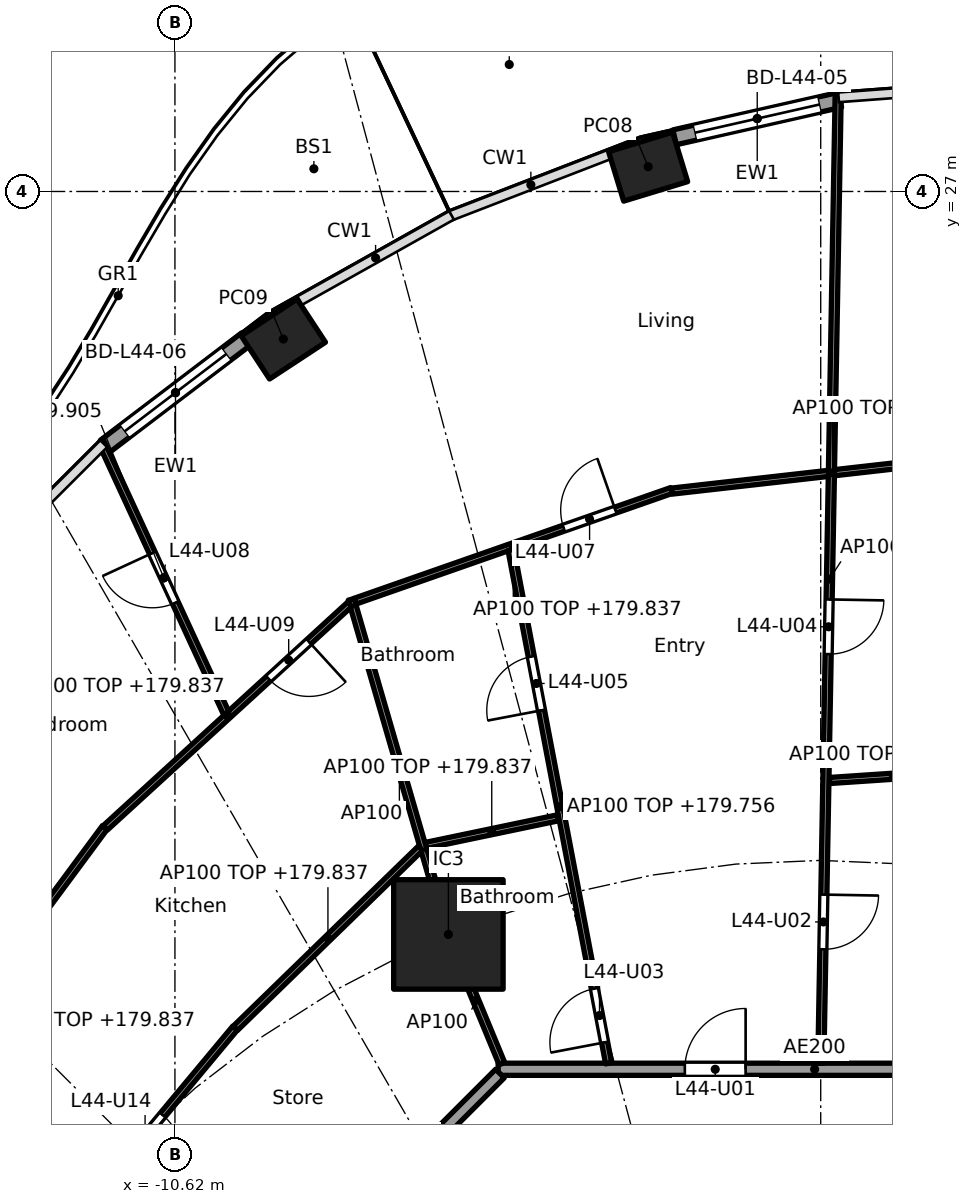
"""IFC4 building model, lengths in metres.
Left out: names, types, materials, properties, quantities, classifications, styles, units other than length and angle.
Written with IfcOpenShell. Run it as: python <this file> out.ifc"""

import sys

from ifc_helpers import new_model, si_unit, direction, frame, frame_2d, origin, origin_2d, place, context, subcontext, project, spatial, rectangle, hollow_rectangle, extrude, element, fill, save


model = new_model("IFC4")
c1 = context("Model", 3, precision=1e-05, world=origin(), true_north=direction((0.0, 1.0)))
c2 = subcontext(c1, "Body", "Model", "MODEL_VIEW")
j1 = project(units=[si_unit("LENGTHUNIT", "METRE"), si_unit("PLANEANGLEUNIT", "RADIAN")], contexts=[c1])
p1 = place(None, origin())
s1 = spatial("IfcSite", under=j1, at=p1, CompositionType="ELEMENT")
p2 = place(p1, origin())
s2 = spatial("IfcBuilding", under=s1, at=p2, CompositionType="ELEMENT")
p3 = place(p2, frame((0.0, 0.0, 177.0)))
s3 = spatial("IfcBuildingStorey", under=s2, at=p3, CompositionType="ELEMENT", Elevation=177.0)
for number, where, z_axis, x_axis in (
    (1, (-2.838, 27.408, 0.0), (0.0, 0.0, 1.0), (-0.957, -0.292, 0.0)),
    (2, (-8.837, 24.573, 0.0), (0.0, 0.0, 1.0), (-0.836, -0.549, 0.0)),
):
    element("IfcColumn", number, at=place(p3, frame(where, z_axis=z_axis, x_axis=x_axis)), inside=s3, PredefinedType="COLUMN", context=c2, shape_type="SweptSolid", body=[
        extrude(hollow_rectangle(XDim=1.1, YDim=0.85, WallThickness=0.036, at=origin_2d()), origin(), (0.0, 0.0, 1.0), 3.7),
    ])
p4 = place(p3, frame((-6.123, 14.782, 0.0), z_axis=(0.0, 0.0, 1.0), x_axis=(1.0, 0.0, 0.0)))
e3 = element("IfcColumn", 3, at=p4, inside=s3, PredefinedType="COLUMN", context=c2, shape_type="SweptSolid", body=[
    extrude(rectangle(XDim=1.8, YDim=1.8, at=origin_2d()), origin(), (0.0, 0.0, 1.0), 3.7),
])
p5 = place(p3, frame((-2.404, 27.891, 0.0), z_axis=(0.0, 0.0, 1.0), x_axis=(0.975324329911, 0.220776926974, 0.0)))
e4 = element("IfcWall", 4, at=p5, inside=s3, PredefinedType="SOLIDWALL", context=c2, shape_type="SweptSolid", body=[
    extrude(rectangle(XDim=2.788, YDim=0.25, at=frame_2d((1.394, 0.0))), origin(), (0.0, 0.0, 1.0), 3.44),
])
p6 = place(p5, frame((0.344, 0.0, 0.0)))
e5 = element("IfcOpeningElement", 5, at=p6, cuts=e4, PredefinedType="OPENING", context=c2, shape_type="SweptSolid", body=[
    extrude(rectangle(XDim=2.1, YDim=2.4, at=frame_2d((1.05, 1.2))), frame((0.0, 0.135, 0.0), z_axis=(0.0, -1.0, 0.0), x_axis=(1.0, 0.0, 0.0)), (0.0, 0.0, 1.0), 0.27),
])
p7 = place(p3, frame((-11.772, 22.809, 0.0), z_axis=(0.0, 0.0, 1.0), x_axis=(0.796055733703, 0.60522332146, 0.0)))
e6 = element("IfcWall", 6, at=p7, inside=s3, PredefinedType="SOLIDWALL", context=c2, shape_type="SweptSolid", body=[
    extrude(rectangle(XDim=2.917, YDim=0.25, at=frame_2d((1.458, 0.0))), origin(), (0.0, 0.0, 1.0), 3.44),
])
p8 = place(p7, frame((0.408, 0.0, 0.0)))
e7 = element("IfcOpeningElement", 7, at=p8, cuts=e6, PredefinedType="OPENING", context=c2, shape_type="SweptSolid", body=[
    extrude(rectangle(XDim=2.1, YDim=2.4, at=frame_2d((1.05, 1.2))), frame((0.0, 0.135, 0.0), z_axis=(0.0, -1.0, 0.0), x_axis=(1.0, 0.0, 0.0)), (0.0, 0.0, 1.0), 0.27),
])
p9 = place(p3, frame((5.104, 12.565, 0.0), z_axis=(0.0, 0.0, 1.0), x_axis=(-1.0, 0.0, 0.0)))
e8 = element("IfcWall", 8, at=p9, inside=s3, PredefinedType="PARTITIONING", context=c2, shape_type="SweptSolid", body=[
    extrude(rectangle(XDim=10.409, YDim=0.2, at=frame_2d((5.205, 0.0))), origin(), (0.0, 0.0, 1.0), 3.44),
])
p10 = place(p9, frame((6.339, 0.0, 0.0)))
e9 = element("IfcOpeningElement", 9, at=p10, cuts=e8, PredefinedType="OPENING", context=c2, shape_type="SweptSolid", body=[
    extrude(rectangle(XDim=1.0, YDim=2.1, at=frame_2d((0.5, 1.05))), frame((0.0, 0.11, 0.0), z_axis=(0.0, -1.0, 0.0), x_axis=(1.0, 0.0, 0.0)), (0.0, 0.0, 1.0), 0.22),
])
p11 = place(p3, frame((-5.275, 12.494, 0.0), z_axis=(0.0, 0.0, 1.0), x_axis=(-0.707106781187, -0.707106781187, 0.0)))
e10 = element("IfcWall", 10, at=p11, inside=s3, PredefinedType="PARTITIONING", context=c2, shape_type="SweptSolid", body=[
    extrude(rectangle(XDim=10.209, YDim=0.2, at=frame_2d((5.104, 0.0))), origin(), (0.0, 0.0, 1.0), 3.44),
])
p12 = place(p3, frame((2.244, 17.455, 0.0), z_axis=(0.0, 0.0, 1.0), x_axis=(-0.997756833447, -0.06694252243, 0.0)))
e11 = element("IfcWall", 11, at=p12, inside=s3, PredefinedType="PARTITIONING", context=c2, shape_type="SweptSolid", body=[
    extrude(rectangle(XDim=2.104, YDim=0.1, at=frame_2d((1.052, 0.0))), origin(), (0.0, 0.0, 1.0), 2.837),
])
p13 = place(p3, frame((2.842, 22.671, 0.0), z_axis=(0.0, 0.0, 1.0), x_axis=(-0.993660315081, -0.112424099879, 0.0)))
e12 = element("IfcWall", 12, at=p13, inside=s3, PredefinedType="PARTITIONING", context=c2, shape_type="SweptSolid", body=[
    extrude(rectangle(XDim=5.325, YDim=0.1, at=frame_2d((2.662, 0.0))), origin(), (0.0, 0.0, 1.0), 2.837),
])
p14 = place(p3, frame((0.002, 12.665, 0.0), z_axis=(0.0, 0.0, 1.0), x_axis=(0.01792079652, 0.999839409631, 0.0)))
e13 = element("IfcWall", 13, at=p14, inside=s3, PredefinedType="PARTITIONING", context=c2, shape_type="SweptSolid", body=[
    extrude(rectangle(XDim=15.926, YDim=0.1, at=frame_2d((7.963, 0.0))), origin(), (0.0, 0.0, 1.0), 2.756),
])
p15 = place(p14, frame((1.873, 0.0, 0.0)))
e14 = element("IfcOpeningElement", 14, at=p15, cuts=e13, PredefinedType="OPENING", context=c2, shape_type="SweptSolid", body=[
    extrude(rectangle(XDim=0.9, YDim=2.1, at=frame_2d((0.45, 1.05))), frame((0.0, 0.06, 0.0), z_axis=(0.0, -1.0, 0.0), x_axis=(1.0, 0.0, 0.0)), (0.0, 0.0, 1.0), 0.12),
])
p16 = place(p14, frame((6.728, 0.0, 0.0)))
e15 = element("IfcOpeningElement", 15, at=p16, cuts=e13, PredefinedType="OPENING", context=c2, shape_type="SweptSolid", body=[
    extrude(rectangle(XDim=0.9, YDim=2.1, at=frame_2d((0.45, 1.05))), frame((0.0, 0.06, 0.0), z_axis=(0.0, -1.0, 0.0), x_axis=(1.0, 0.0, 0.0)), (0.0, 0.0, 1.0), 0.12),
])
p17 = place(p3, frame((-2.452, 22.083, 0.0), z_axis=(0.0, 0.0, 1.0), x_axis=(-0.943916289103, -0.330184856051, 0.0)))
e16 = element("IfcWall", 16, at=p17, inside=s3, PredefinedType="PARTITIONING", context=c2, shape_type="SweptSolid", body=[
    extrude(rectangle(XDim=5.517, YDim=0.1, at=frame_2d((2.759, 0.0))), origin(), (0.0, 0.0, 1.0), 2.837),
])
p18 = place(p17, frame((0.979, 0.0, 0.0)))
e17 = element("IfcOpeningElement", 17, at=p18, cuts=e16, PredefinedType="OPENING", context=c2, shape_type="SweptSolid", body=[
    extrude(rectangle(XDim=0.9, YDim=2.1, at=frame_2d((0.45, 1.05))), frame((0.0, 0.06, 0.0), z_axis=(0.0, -1.0, 0.0), x_axis=(1.0, 0.0, 0.0)), (0.0, 0.0, 1.0), 0.12),
])
p19 = place(p3, frame((-3.488, 12.663, 0.0), z_axis=(0.0, 0.0, 1.0), x_axis=(-0.186783185485, 0.982401161247, 0.0)))
e18 = element("IfcWall", 18, at=p19, inside=s3, PredefinedType="PARTITIONING", context=c2, shape_type="SweptSolid", body=[
    extrude(rectangle(XDim=8.595, YDim=0.1, at=frame_2d((4.298, 0.0))), origin(), (0.0, 0.0, 1.0), 2.756),
])
p20 = place(p19, frame((0.35, 0.0, 0.0)))
e19 = element("IfcOpeningElement", 19, at=p20, cuts=e18, PredefinedType="OPENING", context=c2, shape_type="SweptSolid", body=[
    extrude(rectangle(XDim=0.9, YDim=2.1, at=frame_2d((0.45, 1.05))), frame((0.0, 0.06, 0.0), z_axis=(0.0, -1.0, 0.0), x_axis=(1.0, 0.0, 0.0)), (0.0, 0.0, 1.0), 0.12),
])
p21 = place(p19, frame((5.908, 0.0, 0.0)))
e20 = element("IfcOpeningElement", 20, at=p21, cuts=e18, PredefinedType="OPENING", context=c2, shape_type="SweptSolid", body=[
    extrude(rectangle(XDim=0.9, YDim=2.1, at=frame_2d((0.45, 1.05))), frame((0.0, 0.06, 0.0), z_axis=(0.0, -1.0, 0.0), x_axis=(1.0, 0.0, 0.0)), (0.0, 0.0, 1.0), 0.12),
])
p22 = place(p3, frame((-4.324, 16.699, 0.0), z_axis=(0.0, 0.0, 1.0), x_axis=(-0.978908011866, -0.204301503432, 0.0)))
e21 = element("IfcWall", 21, at=p22, inside=s3, PredefinedType="PARTITIONING", context=c2, shape_type="SweptSolid", body=[
    extrude(rectangle(XDim=2.218, YDim=0.1, at=frame_2d((1.109, 0.0))), origin(), (0.0, 0.0, 1.0), 2.837),
])
p23 = place(p3, frame((-5.243, 12.657, 0.0), z_axis=(0.0, 0.0, 1.0), x_axis=(-0.382719158442, 0.923864733477, 0.0)))
e22 = element("IfcWall", 22, at=p23, inside=s3, PredefinedType="PARTITIONING", context=c2, shape_type="SweptSolid", body=[
    extrude(rectangle(XDim=2.25, YDim=0.1, at=frame_2d((1.125, 0.0))), origin(), (0.0, 0.0, 1.0), 3.44),
])
p24 = place(p3, frame((-6.137, 14.83, 0.0), z_axis=(0.0, 0.0, 1.0), x_axis=(-0.278471793245, 0.960444407744, 0.0)))
e23 = element("IfcWall", 23, at=p24, inside=s3, PredefinedType="PARTITIONING", context=c2, shape_type="SweptSolid", body=[
    extrude(rectangle(XDim=5.688, YDim=0.1, at=frame_2d((2.844, 0.0))), origin(), (0.0, 0.0, 1.0), 3.44),
])
p25 = place(p3, frame((-6.58, 16.201, 0.0), z_axis=(0.0, 0.0, 1.0), x_axis=(-0.716946269374, -0.697128429223, 0.0)))
e24 = element("IfcWall", 24, at=p25, inside=s3, PredefinedType="PARTITIONING", context=c2, shape_type="SweptSolid", body=[
    extrude(rectangle(XDim=4.25, YDim=0.1, at=frame_2d((2.125, 0.0))), origin(), (0.0, 0.0, 1.0), 2.837),
])
p26 = place(p3, frame((-7.744, 20.212, 0.0), z_axis=(0.0, 0.0, 1.0), x_axis=(-0.738051761282, -0.674744097913, 0.0)))
e25 = element("IfcWall", 25, at=p26, inside=s3, PredefinedType="PARTITIONING", context=c2, shape_type="SweptSolid", body=[
    extrude(rectangle(XDim=5.449, YDim=0.1, at=frame_2d((2.725, 0.0))), origin(), (0.0, 0.0, 1.0), 2.837),
])
p27 = place(p26, frame((0.912, 0.0, 0.0)))
e26 = element("IfcOpeningElement", 26, at=p27, cuts=e25, PredefinedType="OPENING", context=c2, shape_type="SweptSolid", body=[
    extrude(rectangle(XDim=0.9, YDim=2.1, at=frame_2d((0.45, 1.05))), frame((0.0, 0.06, 0.0), z_axis=(0.0, -1.0, 0.0), x_axis=(1.0, 0.0, 0.0)), (0.0, 0.0, 1.0), 0.12),
])
p28 = place(p3, frame((-9.776, 18.419, 0.0), z_axis=(0.0, 0.0, 1.0), x_axis=(-0.418998197727, 0.907987065052, 0.0)))
e27 = element("IfcWall", 27, at=p28, inside=s3, PredefinedType="PARTITIONING", context=c2, shape_type="SweptSolid", body=[
    extrude(rectangle(XDim=4.904, YDim=0.1, at=frame_2d((2.452, 0.0))), origin(), (0.0, 0.0, 1.0), 2.905),
])
p29 = place(p28, frame((2.002, 0.0, 0.0)))
e28 = element("IfcOpeningElement", 28, at=p29, cuts=e27, PredefinedType="OPENING", context=c2, shape_type="SweptSolid", body=[
    extrude(rectangle(XDim=0.9, YDim=2.1, at=frame_2d((0.45, 1.05))), frame((0.0, 0.06, 0.0), z_axis=(0.0, -1.0, 0.0), x_axis=(1.0, 0.0, 0.0)), (0.0, 0.0, 1.0), 0.12),
])
p30 = place(p3, frame((-9.631, 13.242, 0.0), z_axis=(0.0, 0.0, 1.0), x_axis=(-0.640315711982, -0.768111833647, 0.0)))
e29 = element("IfcWall", 29, at=p30, inside=s3, PredefinedType="PARTITIONING", context=c2, shape_type="SweptSolid", body=[
    extrude(rectangle(XDim=4.572, YDim=0.1, at=frame_2d((2.286, 0.0))), origin(), (0.0, 0.0, 1.0), 2.837),
])
p31 = place(p30, frame((1.861, 0.0, 0.0)))
e30 = element("IfcOpeningElement", 30, at=p31, cuts=e29, PredefinedType="OPENING", context=c2, shape_type="SweptSolid", body=[
    extrude(rectangle(XDim=0.9, YDim=2.1, at=frame_2d((0.45, 1.05))), frame((0.0, 0.06, 0.0), z_axis=(0.0, -1.0, 0.0), x_axis=(1.0, 0.0, 0.0)), (0.0, 0.0, 1.0), 0.12),
])
p32 = place(p3, frame((-11.773, 16.542, 0.0), z_axis=(0.0, 0.0, 1.0), x_axis=(-0.594694305999, -0.803951915485, 0.0)))
e31 = element("IfcWall", 31, at=p32, inside=s3, PredefinedType="PARTITIONING", context=c2, shape_type="SweptSolid", body=[
    extrude(rectangle(XDim=5.772, YDim=0.1, at=frame_2d((2.886, 0.0))), origin(), (0.0, 0.0, 1.0), 2.837),
])
p33 = place(p3, frame((-10.189, 7.721, 0.0), z_axis=(0.0, 0.0, 1.0), x_axis=(-0.773134429339, 0.634242188892, 0.0)))
e32 = element("IfcWall", 32, at=p33, inside=s3, PredefinedType="PARTITIONING", context=c2, shape_type="SweptSolid", body=[
    extrude(rectangle(XDim=9.552, YDim=0.1, at=frame_2d((4.776, 0.0))), origin(), (0.0, 0.0, 1.0), 2.756),
])
p34 = place(p33, frame((4.367, 0.0, 0.0)))
e33 = element("IfcOpeningElement", 33, at=p34, cuts=e32, PredefinedType="OPENING", context=c2, shape_type="SweptSolid", body=[
    extrude(rectangle(XDim=0.9, YDim=2.1, at=frame_2d((0.45, 1.05))), frame((0.0, 0.06, 0.0), z_axis=(0.0, -1.0, 0.0), x_axis=(1.0, 0.0, 0.0)), (0.0, 0.0, 1.0), 0.12),
])
p35 = place(p6, origin())
e34 = element("IfcDoor", 34, at=p35, inside=s3, OperationType="SLIDING_TO_LEFT", PredefinedType="DOOR", context=c2, shape_type="SweptSolid", body=[
    extrude(rectangle(XDim=2.1, YDim=2.4, at=frame_2d((1.05, 1.2))), frame((0.0, 0.025, 0.0), z_axis=(0.0, -1.0, 0.0), x_axis=(1.0, 0.0, 0.0)), (0.0, 0.0, 1.0), 0.05),
])
fill(e5, e34)
p36 = place(p8, origin())
e35 = element("IfcDoor", 35, at=p36, inside=s3, OperationType="SLIDING_TO_LEFT", PredefinedType="DOOR", context=c2, shape_type="SweptSolid", body=[
    extrude(rectangle(XDim=2.1, YDim=2.4, at=frame_2d((1.05, 1.2))), frame((0.0, 0.025, 0.0), z_axis=(0.0, -1.0, 0.0), x_axis=(1.0, 0.0, 0.0)), (0.0, 0.0, 1.0), 0.05),
])
fill(e7, e35)
p37 = place(p10, frame((1.0, 0.0, 0.0), x_axis=(-1.0, 0.0, 0.0)))
e36 = element("IfcDoor", 36, at=p37, inside=s3, OperationType="SINGLE_SWING_RIGHT", PredefinedType="DOOR", context=c2, shape_type="SweptSolid", body=[
    extrude(rectangle(XDim=1.0, YDim=2.1, at=frame_2d((0.5, 1.05))), frame((0.0, 0.025, 0.0), z_axis=(0.0, -1.0, 0.0), x_axis=(1.0, 0.0, 0.0)), (0.0, 0.0, 1.0), 0.05),
])
fill(e9, e36)
p38 = place(p15, frame((0.9, 0.0, 0.0), x_axis=(-1.0, 0.0, 0.0)))
e37 = element("IfcDoor", 37, at=p38, inside=s3, OperationType="SINGLE_SWING_LEFT", PredefinedType="DOOR", context=c2, shape_type="SweptSolid", body=[
    extrude(rectangle(XDim=0.9, YDim=2.1, at=frame_2d((0.45, 1.05))), frame((0.0, 0.025, 0.0), z_axis=(0.0, -1.0, 0.0), x_axis=(1.0, 0.0, 0.0)), (0.0, 0.0, 1.0), 0.05),
])
fill(e14, e37)
p39 = place(p20, origin())
e38 = element("IfcDoor", 38, at=p39, inside=s3, OperationType="SINGLE_SWING_LEFT", PredefinedType="DOOR", context=c2, shape_type="SweptSolid", body=[
    extrude(rectangle(XDim=0.9, YDim=2.1, at=frame_2d((0.45, 1.05))), frame((0.0, 0.025, 0.0), z_axis=(0.0, -1.0, 0.0), x_axis=(1.0, 0.0, 0.0)), (0.0, 0.0, 1.0), 0.05),
])
fill(e19, e38)
p40 = place(p16, frame((0.9, 0.0, 0.0), x_axis=(-1.0, 0.0, 0.0)))
e39 = element("IfcDoor", 39, at=p40, inside=s3, OperationType="SINGLE_SWING_LEFT", PredefinedType="DOOR", context=c2, shape_type="SweptSolid", body=[
    extrude(rectangle(XDim=0.9, YDim=2.1, at=frame_2d((0.45, 1.05))), frame((0.0, 0.025, 0.0), z_axis=(0.0, -1.0, 0.0), x_axis=(1.0, 0.0, 0.0)), (0.0, 0.0, 1.0), 0.05),
])
fill(e15, e39)
p41 = place(p21, origin())
e40 = element("IfcDoor", 40, at=p41, inside=s3, OperationType="SINGLE_SWING_LEFT", PredefinedType="DOOR", context=c2, shape_type="SweptSolid", body=[
    extrude(rectangle(XDim=0.9, YDim=2.1, at=frame_2d((0.45, 1.05))), frame((0.0, 0.025, 0.0), z_axis=(0.0, -1.0, 0.0), x_axis=(1.0, 0.0, 0.0)), (0.0, 0.0, 1.0), 0.05),
])
fill(e20, e40)
p42 = place(p18, frame((0.9, 0.0, 0.0), x_axis=(-1.0, 0.0, 0.0)))
e41 = element("IfcDoor", 41, at=p42, inside=s3, OperationType="SINGLE_SWING_RIGHT", PredefinedType="DOOR", context=c2, shape_type="SweptSolid", body=[
    extrude(rectangle(XDim=0.9, YDim=2.1, at=frame_2d((0.45, 1.05))), frame((0.0, 0.025, 0.0), z_axis=(0.0, -1.0, 0.0), x_axis=(1.0, 0.0, 0.0)), (0.0, 0.0, 1.0), 0.05),
])
fill(e17, e41)
p43 = place(p29, origin())
e42 = element("IfcDoor", 42, at=p43, inside=s3, OperationType="SINGLE_SWING_RIGHT", PredefinedType="DOOR", context=c2, shape_type="SweptSolid", body=[
    extrude(rectangle(XDim=0.9, YDim=2.1, at=frame_2d((0.45, 1.05))), frame((0.0, 0.025, 0.0), z_axis=(0.0, -1.0, 0.0), x_axis=(1.0, 0.0, 0.0)), (0.0, 0.0, 1.0), 0.05),
])
fill(e28, e42)
p44 = place(p27, origin())
e43 = element("IfcDoor", 43, at=p44, inside=s3, OperationType="SINGLE_SWING_LEFT", PredefinedType="DOOR", context=c2, shape_type="SweptSolid", body=[
    extrude(rectangle(XDim=0.9, YDim=2.1, at=frame_2d((0.45, 1.05))), frame((0.0, 0.025, 0.0), z_axis=(0.0, -1.0, 0.0), x_axis=(1.0, 0.0, 0.0)), (0.0, 0.0, 1.0), 0.05),
])
fill(e26, e43)
p45 = place(p31, origin())
e44 = element("IfcDoor", 44, at=p45, inside=s3, OperationType="SINGLE_SWING_RIGHT", PredefinedType="DOOR", context=c2, shape_type="SweptSolid", body=[
    extrude(rectangle(XDim=0.9, YDim=2.1, at=frame_2d((0.45, 1.05))), frame((0.0, 0.025, 0.0), z_axis=(0.0, -1.0, 0.0), x_axis=(1.0, 0.0, 0.0)), (0.0, 0.0, 1.0), 0.05),
])
fill(e30, e44)
save(model, sys.argv[1])
